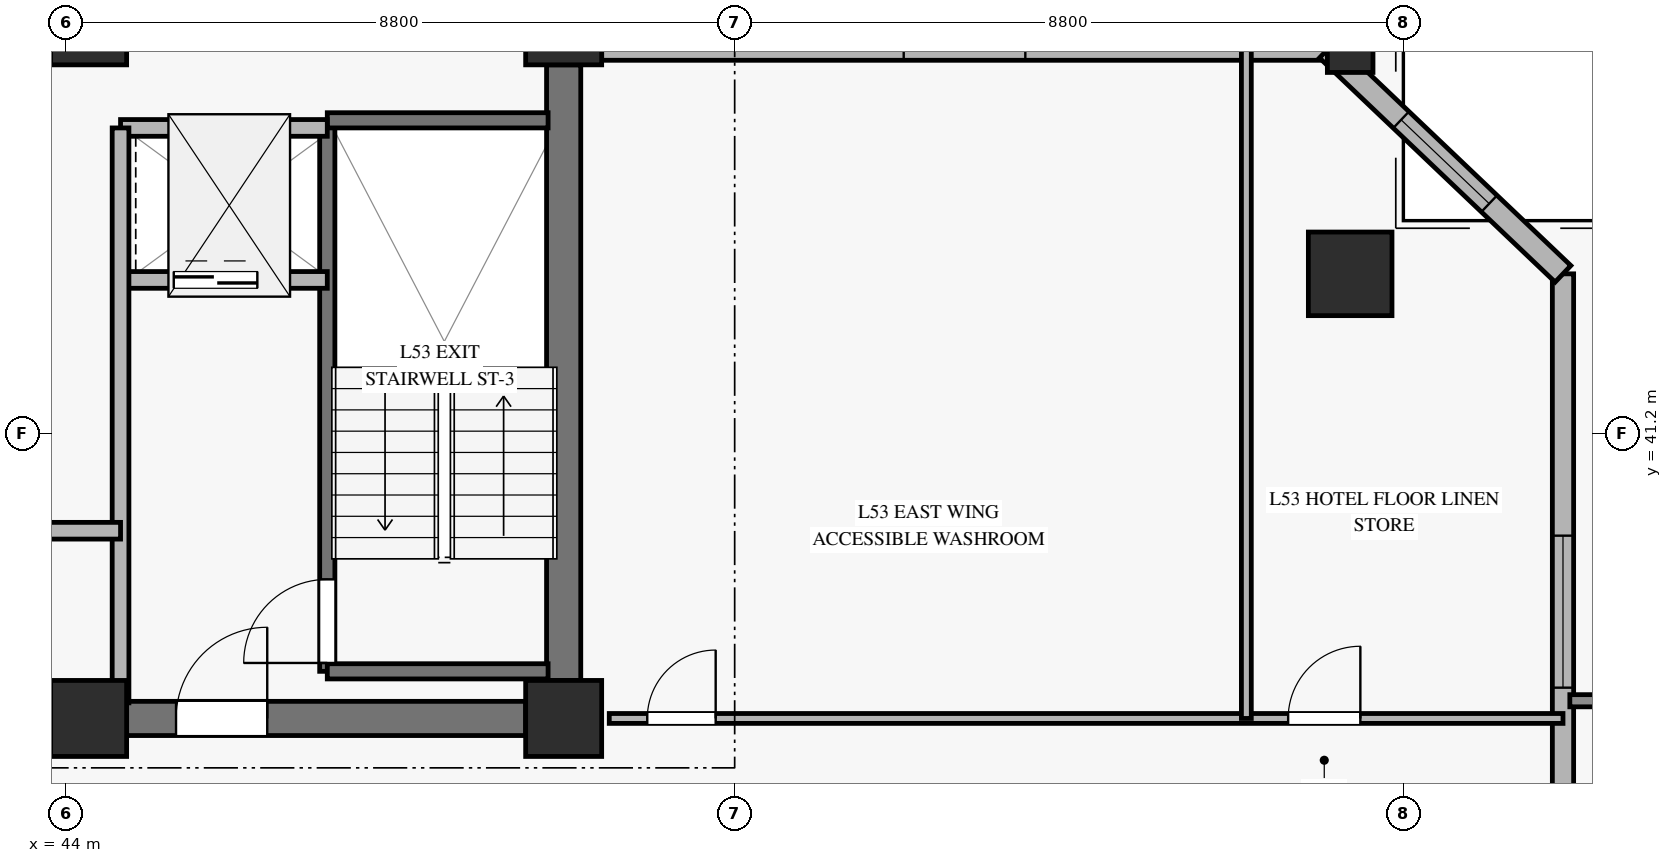
"""IFC4 building model, lengths in metres.
Left out: names, types, materials, properties, quantities, classifications, styles, units other than length and angle.
Written with IfcOpenShell. Run it as: python <this file> out.ifc"""

import sys

from ifc_helpers import new_model, si_unit, direction, frame, frame_2d, origin, origin_2d, place, context, subcontext, project, spatial, rectangle, hollow_rectangle, extrude, source, transform, mapped, element, fill, save


model = new_model("IFC4")
c1 = context("Model", 3, precision=1e-05, world=origin(), true_north=direction((0.0, 1.0)))
c2 = subcontext(c1, "Body", "Model", "MODEL_VIEW")
j1 = project(units=[si_unit("LENGTHUNIT", "METRE"), si_unit("PLANEANGLEUNIT", "RADIAN")], contexts=[c1])
p1 = place(None, origin())
s1 = spatial("IfcSite", under=j1, at=p1, CompositionType="ELEMENT")
p2 = place(p1, origin())
s2 = spatial("IfcBuilding", under=s1, at=p2, CompositionType="ELEMENT")
p3 = place(p2, frame((0.0, 0.0, 209.7)))
s3 = spatial("IfcBuildingStorey", under=s2, at=p3, CompositionType="ELEMENT", Elevation=209.7)
m1 = source(origin(), c2, "Body", "SweptSolid", [
    extrude(rectangle(XDim=1.0, YDim=1.0, at=origin_2d()), origin(), (0.0, 0.0, 1.0), 3.27),
])
for number, where, z_axis, x_axis in (
    (1, (44.3, 37.45, 0.0), (0.0, 0.0, 1.0), (1.0, 0.0, 0.0)),
    (2, (44.3, 46.55, 0.0), (0.0, 0.0, 1.0), (1.0, 0.0, 0.0)),
    (3, (50.55, 37.45, 0.0), (0.0, 0.0, 1.0), (1.0, 0.0, 0.0)),
    (4, (50.55, 46.55, 0.0), (0.0, 0.0, 1.0), (1.0, 0.0, 0.0)),
):
    element("IfcColumn", number, at=place(p3, frame(where, z_axis=z_axis, x_axis=x_axis)), inside=s3, PredefinedType="PILASTER", context=c2, shape_type="MappedRepresentation", body=[
        mapped(m1, transform((0.0, 0.0, 0.0), x_axis=(1.0, 0.0, 0.0), y_axis=(0.0, 1.0, 0.0), z_axis=(0.0, 0.0, 1.0), scale=1.0)),
    ])
p4 = place(p3, frame((44.8, 37.45, 0.0), z_axis=(0.0, 0.0, 1.0), x_axis=(1.0, 0.0, 0.0)))
e5 = element("IfcWall", 5, at=p4, inside=s3, PredefinedType="SHEAR", context=c2, shape_type="SweptSolid", body=[
    extrude(rectangle(XDim=5.25, YDim=0.45, at=frame_2d((2.625, 0.0))), origin(), (0.0, 0.0, 1.0), 3.27),
])
p5 = place(p4, frame((0.65, 0.0, 0.0)))
e6 = element("IfcOpeningElement", 6, at=p5, cuts=e5, PredefinedType="OPENING", context=c2, shape_type="SweptSolid", body=[
    extrude(rectangle(XDim=1.2, YDim=2.15, at=frame_2d((0.6, 1.075))), frame((0.0, 0.235, 0.0), z_axis=(0.0, -1.0, 0.0), x_axis=(1.0, 0.0, 0.0)), (0.0, 0.0, 1.0), 0.47),
])
p6 = place(p3, frame((50.55, 37.95, 0.0), z_axis=(0.0, 0.0, 1.0), x_axis=(0.0, 1.0, 0.0)))
e7 = element("IfcWall", 7, at=p6, inside=s3, PredefinedType="SHEAR", context=c2, shape_type="SweptSolid", body=[
    extrude(rectangle(XDim=8.1, YDim=0.45, at=frame_2d((4.05, 0.0))), origin(), (0.0, 0.0, 1.0), 3.27),
])
m2 = source(origin(), c2, "Body", "SweptSolid", [
    extrude(hollow_rectangle(XDim=1.1, YDim=1.1, WallThickness=0.05, at=origin_2d()), origin(), (0.0, 0.0, 1.0), 3.291),
])
p7 = place(p3, frame((60.898, 43.3, 0.0), z_axis=(-0.112382723475, 0.013945842913, 0.993567127541), x_axis=(-0.123147859225, -0.992388333652, 0.0)))
e8 = element("IfcColumn", 8, at=p7, inside=s3, PredefinedType="COLUMN", context=c2, shape_type="MappedRepresentation", body=[
    mapped(m2, transform((0.0, 0.0, 0.0), x_axis=(1.0, 0.0, 0.0), y_axis=(0.0, 1.0, 0.0), z_axis=(0.0, 0.0, 1.0), scale=1.0)),
])
m3 = source(origin(), c2, "Body", "SweptSolid", [
    extrude(hollow_rectangle(XDim=0.6, YDim=0.6, WallThickness=0.028, at=origin_2d()), origin(), (0.0, 0.0, 1.0), 3.291),
])
p8 = place(p3, frame((60.898, 46.25, 0.0), z_axis=(-0.112393653533, 0.0, 0.99366375935), x_axis=(0.0, -1.0, 0.0)))
e9 = element("IfcColumn", 9, at=p8, inside=s3, PredefinedType="COLUMN", context=c2, shape_type="MappedRepresentation", body=[
    mapped(m3, transform((0.0, 0.0, 0.0), x_axis=(1.0, 0.0, 0.0), y_axis=(0.0, 1.0, 0.0), z_axis=(0.0, 0.0, 1.0), scale=1.0)),
])
p9 = place(p3, frame((63.698, 29.043, 0.0), z_axis=(0.0, 0.0, 1.0), x_axis=(0.0, 1.0, 0.0)))
e10 = element("IfcWall", 10, at=p9, inside=s3, PredefinedType="SOLIDWALL", context=c2, shape_type="SweptSolid", body=[
    extrude(rectangle(XDim=14.257, YDim=0.28, at=frame_2d((7.128, 0.0))), origin(), (0.0, 0.0, 1.0), 2.75),
])
p10 = place(p9, frame((8.812, 0.0, 0.45)))
e11 = element("IfcOpeningElement", 11, at=p10, cuts=e10, PredefinedType="OPENING", context=c2, shape_type="SweptSolid", body=[
    extrude(rectangle(XDim=2.0, YDim=2.0, at=frame_2d((1.0, 1.0))), frame((0.0, 0.15, 0.0), z_axis=(0.0, -1.0, 0.0), x_axis=(1.0, 0.0, 0.0)), (0.0, 0.0, 1.0), 0.3),
])
p11 = place(p3, frame((51.05, 46.25, 0.0), z_axis=(0.0, 0.0, 1.0), x_axis=(1.0, 0.0, 0.0)))
e12 = element("IfcWall", 12, at=p11, inside=s3, PredefinedType="SOLIDWALL", context=c2, shape_type="SweptSolid", body=[
    extrude(rectangle(XDim=9.548, YDim=0.28, at=frame_2d((4.774, 0.0))), origin(), (0.0, 0.0, 1.0), 2.75),
])
p12 = place(p11, frame((3.974, 0.0, 0.45)))
e13 = element("IfcOpeningElement", 13, at=p12, cuts=e12, PredefinedType="OPENING", context=c2, shape_type="SweptSolid", body=[
    extrude(rectangle(XDim=1.6, YDim=2.0, at=frame_2d((0.8, 1.0))), frame((0.0, 0.15, 0.0), z_axis=(0.0, -1.0, 0.0), x_axis=(1.0, 0.0, 0.0)), (0.0, 0.0, 1.0), 0.3),
])
p13 = place(p3, frame((63.698, 43.3, 0.0), z_axis=(0.0, 0.0, 1.0), x_axis=(-0.724432277522, 0.689345976476, 0.0)))
e14 = element("IfcWall", 14, at=p13, inside=s3, PredefinedType="SOLIDWALL", context=c2, shape_type="SweptSolid", body=[
    extrude(rectangle(XDim=4.279, YDim=0.3, at=frame_2d((2.14, 0.0))), origin(), (0.0, 0.0, 1.0), 2.75),
])
p14 = place(p13, frame((1.34, 0.0, 0.45)))
e15 = element("IfcOpeningElement", 15, at=p14, cuts=e14, PredefinedType="OPENING", context=c2, shape_type="SweptSolid", body=[
    extrude(rectangle(XDim=1.6, YDim=2.0, at=frame_2d((0.8, 1.0))), frame((0.0, 0.16, 0.0), z_axis=(0.0, -1.0, 0.0), x_axis=(1.0, 0.0, 0.0)), (0.0, 0.0, 1.0), 0.32),
])
p15 = place(p3, frame((47.44, 38.07, 0.0), z_axis=(0.0, 0.0, 1.0), x_axis=(0.0, 1.0, 0.0)))
e16 = element("IfcWall", 16, at=p15, inside=s3, PredefinedType="SOLIDWALL", context=c2, shape_type="SweptSolid", body=[
    extrude(rectangle(XDim=7.25, YDim=0.2, at=frame_2d((3.625, 0.0))), origin(), (0.0, 0.0, 1.0), 3.5),
])
p16 = place(p15, frame((0.11, 0.0, 0.0)))
e17 = element("IfcOpeningElement", 17, at=p16, cuts=e16, PredefinedType="OPENING", context=c2, shape_type="SweptSolid", body=[
    extrude(rectangle(XDim=1.1, YDim=2.15, at=frame_2d((0.55, 1.075))), frame((0.0, 0.11, 0.0), z_axis=(0.0, -1.0, 0.0), x_axis=(1.0, 0.0, 0.0)), (0.0, 0.0, 1.0), 0.22),
])
for number, where, z_axis, x_axis in (
    (18, (47.44, 45.32, 0.0), (0.0, 0.0, 1.0), (1.0, 0.0, 0.0)),
    (19, (47.44, 38.07, 0.0), (0.0, 0.0, 1.0), (1.0, 0.0, 0.0)),
):
    element("IfcWall", number, at=place(p3, frame(where, z_axis=z_axis, x_axis=x_axis)), inside=s3, PredefinedType="SOLIDWALL", context=c2, shape_type="SweptSolid", body=[
        extrude(rectangle(XDim=2.905, YDim=0.2, at=frame_2d((1.453, 0.0))), origin(), (0.0, 0.0, 1.0), 3.5),
    ])
p17 = place(p3, frame((44.72, 43.22, 0.0), z_axis=(0.0, 0.0, 1.0), x_axis=(1.0, 0.0, 0.0)))
e20 = element("IfcWall", 20, at=p17, inside=s3, PredefinedType="SOLIDWALL", context=c2, shape_type="SweptSolid", body=[
    extrude(rectangle(XDim=2.72, YDim=0.22, at=frame_2d((1.36, 0.0))), origin(), (0.0, 0.0, 1.0), 3.27),
])
p18 = place(p17, frame((0.7, 0.0, 0.0)))
e21 = element("IfcOpeningElement", 21, at=p18, cuts=e20, PredefinedType="OPENING", context=c2, shape_type="SweptSolid", body=[
    extrude(rectangle(XDim=1.1, YDim=2.2, at=frame_2d((0.55, 1.1))), frame((0.0, 0.12, 0.0), z_axis=(0.0, -1.0, 0.0), x_axis=(1.0, 0.0, 0.0)), (0.0, 0.0, 1.0), 0.24),
])
p19 = place(p3, frame((44.72, 45.22, 0.0), z_axis=(0.0, 0.0, 1.0), x_axis=(1.0, 0.0, 0.0)))
e22 = element("IfcWall", 22, at=p19, inside=s3, PredefinedType="SOLIDWALL", context=c2, shape_type="SweptSolid", body=[
    extrude(rectangle(XDim=2.72, YDim=0.22, at=frame_2d((1.36, 0.0))), origin(), (0.0, 0.0, 1.0), 3.27),
])
p20 = place(p3, frame((44.72, 37.655, 0.0), z_axis=(0.0, 0.0, 1.0), x_axis=(0.0, 1.0, 0.0)))
e23 = element("IfcWall", 23, at=p20, inside=s3, PredefinedType="SOLIDWALL", context=c2, shape_type="SweptSolid", body=[
    extrude(rectangle(XDim=7.565, YDim=0.22, at=frame_2d((3.782, 0.0))), origin(), (0.0, 0.0, 1.0), 3.27),
])
p21 = place(p3, frame((36.12, 39.92, 0.0), z_axis=(0.0, 0.0, 1.0), x_axis=(1.0, 0.0, 0.0)))
e24 = element("IfcWall", 24, at=p21, inside=s3, PredefinedType="SOLIDWALL", context=c2, shape_type="SweptSolid", body=[
    extrude(rectangle(XDim=8.6, YDim=0.22, at=frame_2d((4.3, 0.0))), origin(), (0.0, 0.0, 1.0), 2.555),
])
p22 = place(p3, frame((51.15, 37.45, 0.0), z_axis=(0.0, 0.0, 1.0), x_axis=(1.0, 0.0, 0.0)))
e25 = element("IfcWall", 25, at=p22, inside=s3, PredefinedType="PARTITIONING", context=c2, shape_type="SweptSolid", body=[
    extrude(rectangle(XDim=12.548, YDim=0.13, at=frame_2d((6.274, 0.0))), origin(), (0.0, 0.0, 1.0), 2.755),
])
p23 = place(p22, frame((0.5, 0.0, 0.0)))
e26 = element("IfcOpeningElement", 26, at=p23, cuts=e25, PredefinedType="OPENING", context=c2, shape_type="SweptSolid", body=[
    extrude(rectangle(XDim=0.9, YDim=2.1, at=frame_2d((0.45, 1.05))), frame((0.0, 0.075, 0.0), z_axis=(0.0, -1.0, 0.0), x_axis=(1.0, 0.0, 0.0)), (0.0, 0.0, 1.0), 0.15),
])
p24 = place(p22, frame((8.932, 0.0, 0.0)))
e27 = element("IfcOpeningElement", 27, at=p24, cuts=e25, PredefinedType="OPENING", context=c2, shape_type="SweptSolid", body=[
    extrude(rectangle(XDim=0.95, YDim=2.1, at=frame_2d((0.475, 1.05))), frame((0.0, 0.075, 0.0), z_axis=(0.0, -1.0, 0.0), x_axis=(1.0, 0.0, 0.0)), (0.0, 0.0, 1.0), 0.15),
])
p25 = place(p3, frame((59.532, 37.45, 0.0), z_axis=(0.0, 0.0, 1.0), x_axis=(0.0, 1.0, 0.0)))
e28 = element("IfcWall", 28, at=p25, inside=s3, PredefinedType="PARTITIONING", context=c2, shape_type="SweptSolid", body=[
    extrude(rectangle(XDim=8.8, YDim=0.13, at=frame_2d((4.4, 0.0))), origin(), (0.0, 0.0, 1.0), 2.755),
])
m4 = source(origin(), c2, "Body", "SweptSolid", [
    extrude(rectangle(XDim=2.0, YDim=2.0, at=frame_2d((1.0, 1.0))), frame((0.0, 0.03, 0.0), z_axis=(0.0, -1.0, 0.0), x_axis=(1.0, 0.0, 0.0)), (0.0, 0.0, 1.0), 0.06),
])
p26 = place(p10, origin())
e29 = element("IfcWindow", 29, at=p26, inside=s3, PartitioningType="SINGLE_PANEL", PredefinedType="WINDOW", context=c2, shape_type="MappedRepresentation", body=[
    mapped(m4, transform((0.0, 0.0, 0.0), x_axis=(1.0, 0.0, 0.0), y_axis=(0.0, 1.0, 0.0), z_axis=(0.0, 0.0, 1.0), scale=1.0)),
])
fill(e11, e29)
m5 = source(origin(), c2, "Body", "SweptSolid", [
    extrude(rectangle(XDim=1.6, YDim=2.0, at=frame_2d((0.8, 1.0))), frame((0.0, 0.03, 0.0), z_axis=(0.0, -1.0, 0.0), x_axis=(1.0, 0.0, 0.0)), (0.0, 0.0, 1.0), 0.06),
])
p27 = place(p14, origin())
e30 = element("IfcWindow", 30, at=p27, inside=s3, PartitioningType="SINGLE_PANEL", PredefinedType="WINDOW", context=c2, shape_type="MappedRepresentation", body=[
    mapped(m5, transform((0.0, 0.0, 0.0), x_axis=(1.0, 0.0, 0.0), y_axis=(0.0, 1.0, 0.0), z_axis=(0.0, 0.0, 1.0), scale=1.0)),
])
fill(e15, e30)
m6 = source(origin(), c2, "Body", "SweptSolid", [
    extrude(rectangle(XDim=1.1, YDim=2.15, at=frame_2d((0.55, 1.075))), frame((0.0, 0.025, 0.0), z_axis=(0.0, -1.0, 0.0), x_axis=(1.0, 0.0, 0.0)), (0.0, 0.0, 1.0), 0.05),
])
p28 = place(p16, origin())
e31 = element("IfcDoor", 31, at=p28, inside=s3, OperationType="SINGLE_SWING_LEFT", PredefinedType="DOOR", context=c2, shape_type="MappedRepresentation", body=[
    mapped(m6, transform((0.0, 0.0, 0.0), x_axis=(1.0, 0.0, 0.0), y_axis=(0.0, 1.0, 0.0), z_axis=(0.0, 0.0, 1.0), scale=1.0)),
])
fill(e17, e31)
m7 = source(origin(), c2, "Body", "SweptSolid", [
    extrude(rectangle(XDim=1.1, YDim=2.2, at=frame_2d((0.55, 1.1))), frame((0.0, 0.025, 0.0), z_axis=(0.0, -1.0, 0.0), x_axis=(1.0, 0.0, 0.0)), (0.0, 0.0, 1.0), 0.05),
])
p29 = place(p18, origin())
e32 = element("IfcDoor", 32, at=p29, inside=s3, OperationType="SLIDING_TO_LEFT", PredefinedType="DOOR", context=c2, shape_type="MappedRepresentation", body=[
    mapped(m7, transform((0.0, 0.0, 0.0), x_axis=(1.0, 0.0, 0.0), y_axis=(0.0, 1.0, 0.0), z_axis=(0.0, 0.0, 1.0), scale=1.0)),
])
fill(e21, e32)
m8 = source(origin(), c2, "Body", "SweptSolid", [
    extrude(rectangle(XDim=1.2, YDim=2.15, at=frame_2d((0.6, 1.075))), frame((0.0, 0.025, 0.0), z_axis=(0.0, -1.0, 0.0), x_axis=(1.0, 0.0, 0.0)), (0.0, 0.0, 1.0), 0.05),
])
p30 = place(p5, origin())
e33 = element("IfcDoor", 33, at=p30, inside=s3, OperationType="SINGLE_SWING_RIGHT", PredefinedType="DOOR", context=c2, shape_type="MappedRepresentation", body=[
    mapped(m8, transform((0.0, 0.0, 0.0), x_axis=(1.0, 0.0, 0.0), y_axis=(0.0, 1.0, 0.0), z_axis=(0.0, 0.0, 1.0), scale=1.0)),
])
fill(e6, e33)
m9 = source(origin(), c2, "Body", "SweptSolid", [
    extrude(rectangle(XDim=0.9, YDim=2.1, at=frame_2d((0.45, 1.05))), frame((0.0, 0.025, 0.0), z_axis=(0.0, -1.0, 0.0), x_axis=(1.0, 0.0, 0.0)), (0.0, 0.0, 1.0), 0.05),
])
p31 = place(p23, origin())
e34 = element("IfcDoor", 34, at=p31, inside=s3, OperationType="SINGLE_SWING_RIGHT", PredefinedType="DOOR", context=c2, shape_type="MappedRepresentation", body=[
    mapped(m9, transform((0.0, 0.0, 0.0), x_axis=(1.0, 0.0, 0.0), y_axis=(0.0, 1.0, 0.0), z_axis=(0.0, 0.0, 1.0), scale=1.0)),
])
fill(e26, e34)
m10 = source(origin(), c2, "Body", "SweptSolid", [
    extrude(rectangle(XDim=0.95, YDim=2.1, at=frame_2d((0.475, 1.05))), frame((0.0, 0.025, 0.0), z_axis=(0.0, -1.0, 0.0), x_axis=(1.0, 0.0, 0.0)), (0.0, 0.0, 1.0), 0.05),
])
p32 = place(p24, origin())
e35 = element("IfcDoor", 35, at=p32, inside=s3, OperationType="SINGLE_SWING_RIGHT", PredefinedType="DOOR", context=c2, shape_type="MappedRepresentation", body=[
    mapped(m10, transform((0.0, 0.0, 0.0), x_axis=(1.0, 0.0, 0.0), y_axis=(0.0, 1.0, 0.0), z_axis=(0.0, 0.0, 1.0), scale=1.0)),
])
fill(e27, e35)
save(model, sys.argv[1])
